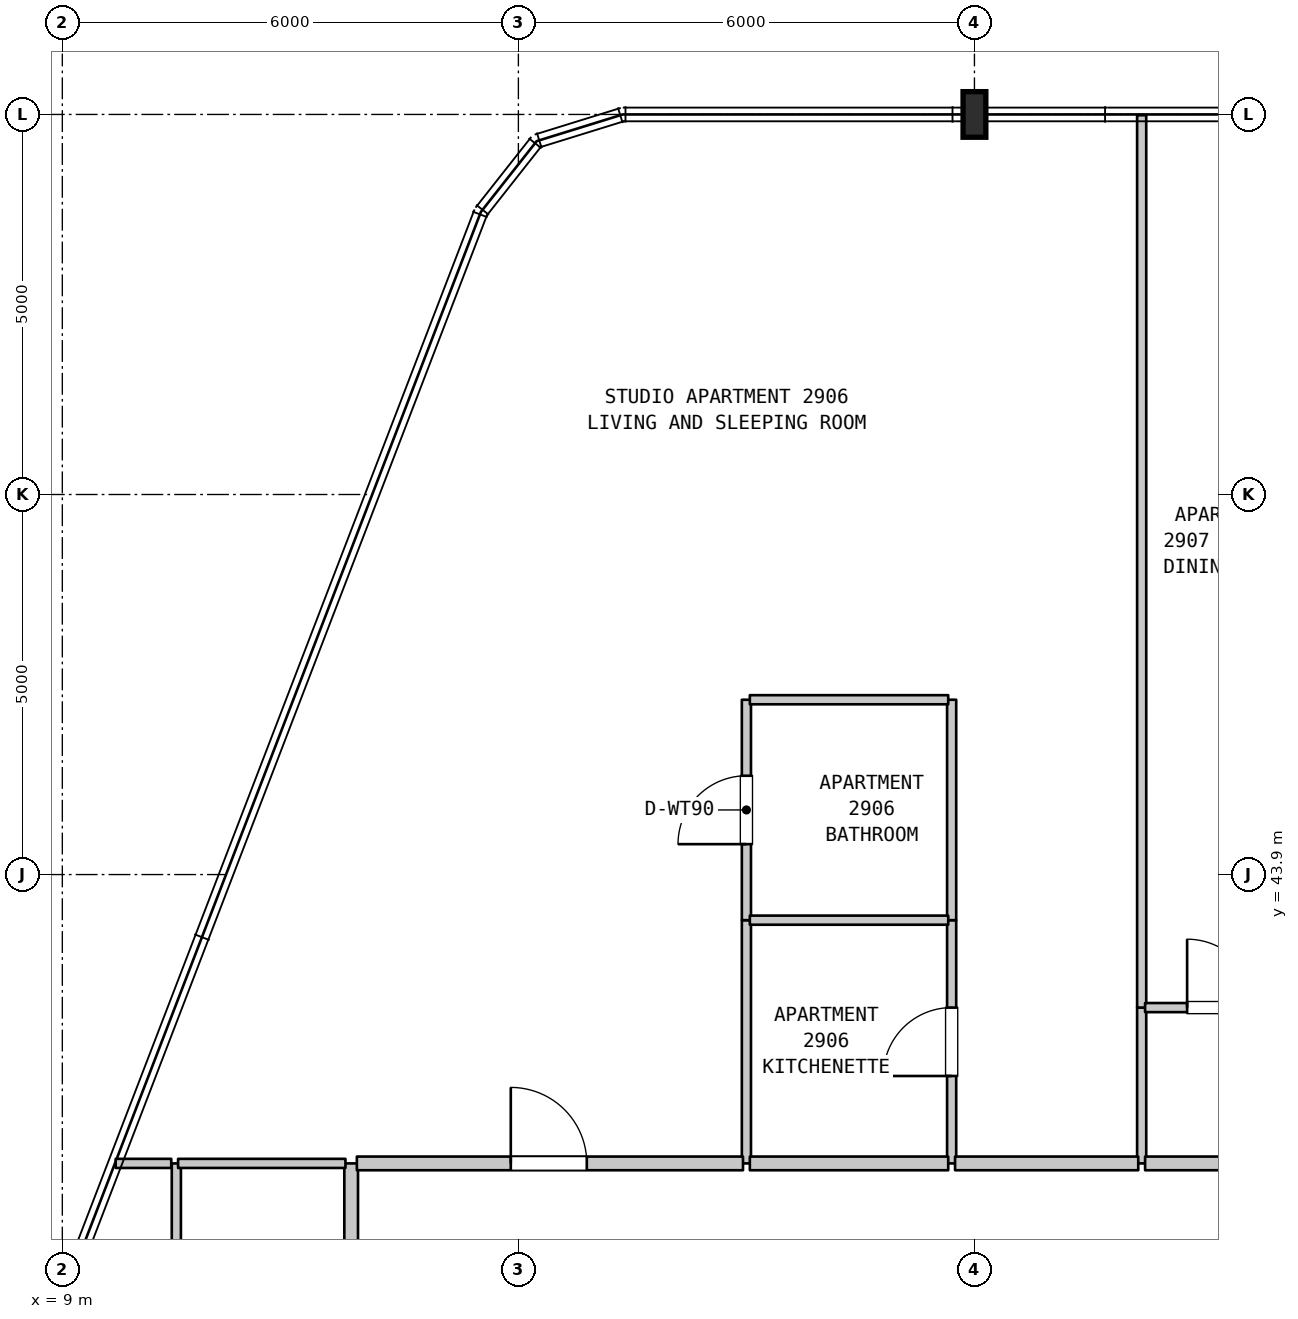
"""IFC4 building model, lengths in metres.
Left out: names, types, materials, properties, quantities, classifications, styles, units other than length and angle.
Written with IfcOpenShell. Run it as: python <this file> out.ifc"""

import sys

from ifc_helpers import new_model, si_unit, direction, frame, frame_2d, origin, origin_2d, place, context, subcontext, project, spatial, rectangle, i_section, extrude, element, fill, save


model = new_model("IFC4")
c1 = context("Model", 3, precision=1e-05, world=origin(), true_north=direction((0.0, 1.0)))
c2 = subcontext(c1, "Body", "Model", "MODEL_VIEW")
j1 = project(units=[si_unit("LENGTHUNIT", "METRE"), si_unit("PLANEANGLEUNIT", "RADIAN")], contexts=[c1])
p1 = place(None, origin())
s1 = spatial("IfcSite", under=j1, at=p1, CompositionType="ELEMENT")
p2 = place(p1, origin())
s2 = spatial("IfcBuilding", under=s1, at=p2, CompositionType="ELEMENT")
p3 = place(p2, frame((0.0, 0.0, 120.5)))
s3 = spatial("IfcBuildingStorey", under=s2, at=p3, CompositionType="ELEMENT", Elevation=120.5)
p4 = place(p3, frame((21.0, 53.9, 0.0), z_axis=(0.0, 0.0, 1.0), x_axis=(1.0, 0.0, 0.0)))
e1 = element("IfcColumn", 1, at=p4, inside=s3, PredefinedType="COLUMN", context=c2, shape_type="SweptSolid", body=[
    extrude(i_section(OverallWidth=0.3, OverallDepth=0.6, WebThickness=0.015, FlangeThickness=0.03, FilletRadius=0.027, at=origin_2d()), origin(), (0.0, 0.0, 1.0), 4.8),
])
p5 = place(p3, frame((10.5, 35.55, 0.0), z_axis=(0.0, 0.0, 1.0), x_axis=(0.0, 1.0, 0.0)))
e2 = element("IfcWall", 2, at=p5, inside=s3, PredefinedType="PARTITIONING", context=c2, shape_type="SweptSolid", body=[
    extrude(rectangle(XDim=4.55, YDim=0.12, at=frame_2d((2.275, 0.0))), origin(), (0.0, 0.0, 1.0), 4.48),
])
p6 = place(p3, frame((12.8, 35.55, 0.0), z_axis=(0.0, 0.0, 1.0), x_axis=(0.0, 1.0, 0.0)))
e3 = element("IfcWall", 3, at=p6, inside=s3, PredefinedType="STANDARD", context=c2, shape_type="SweptSolid", body=[
    extrude(rectangle(XDim=4.55, YDim=0.18, at=frame_2d((2.275, 0.0))), origin(), (0.0, 0.0, 1.0), 4.48),
])
p7 = place(p3, frame((18.0, 40.1, 0.0), z_axis=(0.0, 0.0, 1.0), x_axis=(0.0, 1.0, 0.0)))
e4 = element("IfcWall", 4, at=p7, inside=s3, PredefinedType="PARTITIONING", context=c2, shape_type="SweptSolid", body=[
    extrude(rectangle(XDim=3.2, YDim=0.12, at=frame_2d((1.6, 0.0))), origin(), (0.0, 0.0, 1.0), 4.48),
])
p8 = place(p3, frame((18.0, 43.3, 0.0), z_axis=(0.0, 0.0, 1.0), x_axis=(0.0, 1.0, 0.0)))
e5 = element("IfcWall", 5, at=p8, inside=s3, PredefinedType="PARTITIONING", context=c2, shape_type="SweptSolid", body=[
    extrude(rectangle(XDim=2.9, YDim=0.12, at=frame_2d((1.45, 0.0))), origin(), (0.0, 0.0, 1.0), 4.48),
])
p9 = place(p8, frame((1.0, 0.0, 0.0)))
e6 = element("IfcOpeningElement", 6, at=p9, cuts=e5, PredefinedType="OPENING", context=c2, shape_type="SweptSolid", body=[
    extrude(rectangle(XDim=0.9, YDim=2.1, at=frame_2d((0.45, 1.05))), frame((0.0, 0.07, 0.0), z_axis=(0.0, -1.0, 0.0), x_axis=(1.0, 0.0, 0.0)), (0.0, 0.0, 1.0), 0.14),
])
p10 = place(p3, frame((20.7, 40.1, 0.0), z_axis=(0.0, 0.0, 1.0), x_axis=(0.0, 1.0, 0.0)))
e7 = element("IfcWall", 7, at=p10, inside=s3, PredefinedType="PARTITIONING", context=c2, shape_type="SweptSolid", body=[
    extrude(rectangle(XDim=3.2, YDim=0.12, at=frame_2d((1.6, 0.0))), origin(), (0.0, 0.0, 1.0), 4.48),
])
p11 = place(p10, frame((1.15, 0.0, 0.0)))
e8 = element("IfcOpeningElement", 8, at=p11, cuts=e7, PredefinedType="OPENING", context=c2, shape_type="SweptSolid", body=[
    extrude(rectangle(XDim=0.9, YDim=2.15, at=frame_2d((0.45, 1.075))), frame((0.0, 0.07, 0.0), z_axis=(0.0, -1.0, 0.0), x_axis=(1.0, 0.0, 0.0)), (0.0, 0.0, 1.0), 0.14),
])
p12 = place(p3, frame((20.7, 43.3, 0.0), z_axis=(0.0, 0.0, 1.0), x_axis=(0.0, 1.0, 0.0)))
e9 = element("IfcWall", 9, at=p12, inside=s3, PredefinedType="PARTITIONING", context=c2, shape_type="SweptSolid", body=[
    extrude(rectangle(XDim=2.9, YDim=0.12, at=frame_2d((1.45, 0.0))), origin(), (0.0, 0.0, 1.0), 4.48),
])
p13 = place(p3, frame((23.2, 40.1, 0.0), z_axis=(0.0, 0.0, 1.0), x_axis=(0.0, 1.0, 0.0)))
e10 = element("IfcWall", 10, at=p13, inside=s3, PredefinedType="PARTITIONING", context=c2, shape_type="SweptSolid", body=[
    extrude(rectangle(XDim=2.05, YDim=0.12, at=frame_2d((1.025, 0.0))), origin(), (0.0, 0.0, 1.0), 4.48),
])
p14 = place(p3, frame((23.2, 42.15, 0.0), z_axis=(0.0, 0.0, 1.0), x_axis=(0.0, 1.0, 0.0)))
e11 = element("IfcWall", 11, at=p14, inside=s3, PredefinedType="PARTITIONING", context=c2, shape_type="SweptSolid", body=[
    extrude(rectangle(XDim=11.74, YDim=0.12, at=frame_2d((5.87, 0.0))), origin(), (0.0, 0.0, 1.0), 4.48),
])
p15 = place(p3, frame((9.702, 40.1, 0.0), z_axis=(0.0, 0.0, 1.0), x_axis=(1.0, 0.0, 0.0)))
e12 = element("IfcWall", 12, at=p15, inside=s3, PredefinedType="PARTITIONING", context=c2, shape_type="SweptSolid", body=[
    extrude(rectangle(XDim=0.731, YDim=0.12, at=frame_2d((0.366, 0.0))), origin(), (0.0, 0.0, 1.0), 4.48),
])
p16 = place(p3, frame((10.523, 40.1, 0.0), z_axis=(0.0, 0.0, 1.0), x_axis=(1.0, 0.0, 0.0)))
e13 = element("IfcWall", 13, at=p16, inside=s3, PredefinedType="PARTITIONING", context=c2, shape_type="SweptSolid", body=[
    extrude(rectangle(XDim=2.202, YDim=0.12, at=frame_2d((1.101, 0.0))), origin(), (0.0, 0.0, 1.0), 4.48),
])
p17 = place(p3, frame((12.875, 40.1, 0.0), z_axis=(0.0, 0.0, 1.0), x_axis=(1.0, 0.0, 0.0)))
e14 = element("IfcWall", 14, at=p17, inside=s3, PredefinedType="STANDARD", context=c2, shape_type="SweptSolid", body=[
    extrude(rectangle(XDim=5.08, YDim=0.18, at=frame_2d((2.54, 0.0))), origin(), (0.0, 0.0, 1.0), 4.48),
])
p18 = place(p17, frame((2.025, 0.0, 0.0)))
e15 = element("IfcOpeningElement", 15, at=p18, cuts=e14, PredefinedType="OPENING", context=c2, shape_type="SweptSolid", body=[
    extrude(rectangle(XDim=1.0, YDim=2.15, at=frame_2d((0.5, 1.075))), frame((0.0, 0.1, 0.0), z_axis=(0.0, -1.0, 0.0), x_axis=(1.0, 0.0, 0.0)), (0.0, 0.0, 1.0), 0.2),
])
p19 = place(p3, frame((18.045, 40.1, 0.0), z_axis=(0.0, 0.0, 1.0), x_axis=(1.0, 0.0, 0.0)))
e16 = element("IfcWall", 16, at=p19, inside=s3, PredefinedType="STANDARD", context=c2, shape_type="SweptSolid", body=[
    extrude(rectangle(XDim=2.61, YDim=0.18, at=frame_2d((1.305, 0.0))), origin(), (0.0, 0.0, 1.0), 4.48),
])
p20 = place(p3, frame((20.745, 40.1, 0.0), z_axis=(0.0, 0.0, 1.0), x_axis=(1.0, 0.0, 0.0)))
e17 = element("IfcWall", 17, at=p20, inside=s3, PredefinedType="STANDARD", context=c2, shape_type="SweptSolid", body=[
    extrude(rectangle(XDim=2.41, YDim=0.18, at=frame_2d((1.205, 0.0))), origin(), (0.0, 0.0, 1.0), 4.48),
])
p21 = place(p3, frame((23.245, 40.1, 0.0), z_axis=(0.0, 0.0, 1.0), x_axis=(1.0, 0.0, 0.0)))
e18 = element("IfcWall", 18, at=p21, inside=s3, PredefinedType="STANDARD", context=c2, shape_type="SweptSolid", body=[
    extrude(rectangle(XDim=5.095, YDim=0.18, at=frame_2d((2.547, 0.0))), origin(), (0.0, 0.0, 1.0), 4.48),
])
p22 = place(p21, frame((2.08, 0.0, 0.0)))
e19 = element("IfcOpeningElement", 19, at=p22, cuts=e18, PredefinedType="OPENING", context=c2, shape_type="SweptSolid", body=[
    extrude(rectangle(XDim=1.0, YDim=2.15, at=frame_2d((0.5, 1.075))), frame((0.0, 0.1, 0.0), z_axis=(0.0, -1.0, 0.0), x_axis=(1.0, 0.0, 0.0)), (0.0, 0.0, 1.0), 0.2),
])
p23 = place(p3, frame((23.245, 42.15, 0.0), z_axis=(0.0, 0.0, 1.0), x_axis=(1.0, 0.0, 0.0)))
e20 = element("IfcWall", 20, at=p23, inside=s3, PredefinedType="PARTITIONING", context=c2, shape_type="SweptSolid", body=[
    extrude(rectangle(XDim=2.16, YDim=0.12, at=frame_2d((1.08, 0.0))), origin(), (0.0, 0.0, 1.0), 4.48),
])
p24 = place(p23, frame((0.553, 0.0, 0.0)))
e21 = element("IfcOpeningElement", 21, at=p24, cuts=e20, PredefinedType="OPENING", context=c2, shape_type="SweptSolid", body=[
    extrude(rectangle(XDim=0.9, YDim=2.15, at=frame_2d((0.45, 1.075))), frame((0.0, 0.07, 0.0), z_axis=(0.0, -1.0, 0.0), x_axis=(1.0, 0.0, 0.0)), (0.0, 0.0, 1.0), 0.14),
])
for number, where, z_axis, x_axis in (
    (22, (18.045, 43.3, 0.0), (0.0, 0.0, 1.0), (1.0, 0.0, 0.0)),
    (23, (18.045, 46.2, 0.0), (0.0, 0.0, 1.0), (1.0, 0.0, 0.0)),
):
    element("IfcWall", number, at=place(p3, frame(where, z_axis=z_axis, x_axis=x_axis)), inside=s3, PredefinedType="PARTITIONING", context=c2, shape_type="SweptSolid", body=[
        extrude(rectangle(XDim=2.61, YDim=0.12, at=frame_2d((1.305, 0.0))), origin(), (0.0, 0.0, 1.0), 4.48),
    ])
p25 = place(p9, origin())
e24 = element("IfcDoor", 24, at=p25, inside=s3, OperationType="SINGLE_SWING_LEFT", PredefinedType="DOOR", context=c2, shape_type="SweptSolid", body=[
    extrude(rectangle(XDim=0.9, YDim=2.1, at=frame_2d((0.45, 1.05))), frame((0.0, 0.025, 0.0), z_axis=(0.0, -1.0, 0.0), x_axis=(1.0, 0.0, 0.0)), (0.0, 0.0, 1.0), 0.05),
])
fill(e6, e24)
p26 = place(p11, origin())
e25 = element("IfcDoor", 25, at=p26, inside=s3, OperationType="SINGLE_SWING_LEFT", PredefinedType="DOOR", context=c2, shape_type="SweptSolid", body=[
    extrude(rectangle(XDim=0.9, YDim=2.15, at=frame_2d((0.45, 1.075))), frame((0.0, 0.025, 0.0), z_axis=(0.0, -1.0, 0.0), x_axis=(1.0, 0.0, 0.0)), (0.0, 0.0, 1.0), 0.05),
])
fill(e8, e25)
p27 = place(p18, origin())
e26 = element("IfcDoor", 26, at=p27, inside=s3, OperationType="SINGLE_SWING_LEFT", PredefinedType="DOOR", context=c2, shape_type="SweptSolid", body=[
    extrude(rectangle(XDim=1.0, YDim=2.15, at=frame_2d((0.5, 1.075))), frame((0.0, 0.025, 0.0), z_axis=(0.0, -1.0, 0.0), x_axis=(1.0, 0.0, 0.0)), (0.0, 0.0, 1.0), 0.05),
])
fill(e15, e26)
p28 = place(p24, origin())
e27 = element("IfcDoor", 27, at=p28, inside=s3, OperationType="SINGLE_SWING_LEFT", PredefinedType="DOOR", context=c2, shape_type="SweptSolid", body=[
    extrude(rectangle(XDim=0.9, YDim=2.15, at=frame_2d((0.45, 1.075))), frame((0.0, 0.025, 0.0), z_axis=(0.0, -1.0, 0.0), x_axis=(1.0, 0.0, 0.0)), (0.0, 0.0, 1.0), 0.05),
])
fill(e21, e27)
save(model, sys.argv[1])
